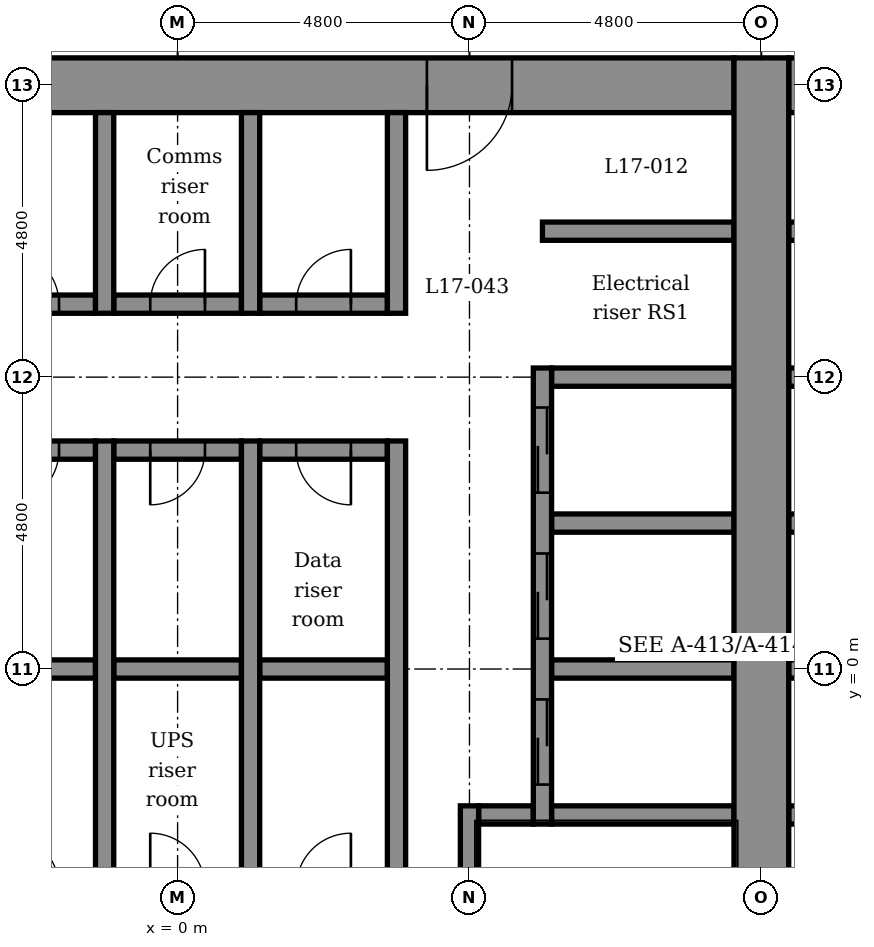
"""IFC4 building model, lengths in metres.
Left out: names, types, materials, properties, quantities, classifications, styles, units other than length and angle.
Written with IfcOpenShell. Run it as: python <this file> out.ifc"""

import sys

from ifc_helpers import new_model, si_unit, direction, frame, frame_2d, origin, place, context, subcontext, project, spatial, rectangle, extrude, element, fill, save


model = new_model("IFC4")
c1 = context("Model", 3, precision=1e-05, world=origin(), true_north=direction((0.0, 1.0)))
c2 = subcontext(c1, "Body", "Model", "MODEL_VIEW")
j1 = project(units=[si_unit("LENGTHUNIT", "METRE"), si_unit("PLANEANGLEUNIT", "RADIAN")], contexts=[c1])
p1 = place(None, origin())
s1 = spatial("IfcSite", under=j1, at=p1, CompositionType="ELEMENT")
p2 = place(p1, origin())
s2 = spatial("IfcBuilding", under=s1, at=p2, CompositionType="ELEMENT")
p3 = place(p2, frame((0.0, 0.0, 91.4)))
s3 = spatial("IfcBuildingStorey", under=s2, at=p3, CompositionType="ELEMENT", Elevation=91.4)
p4 = place(p3, frame((4.95, -2.4, -0.2), z_axis=(0.0, 0.0, 1.0), x_axis=(1.0, 0.0, 0.0)))
e1 = element("IfcWall", 1, at=p4, inside=s3, PredefinedType="STANDARD", context=c2, shape_type="SweptSolid", body=[
    extrude(rectangle(XDim=0.9, YDim=0.3, at=frame_2d((0.45, 0.0))), origin(), (0.0, 0.0, 1.0), 4.5),
])
p5 = place(p3, frame((6.15, -2.4, -0.2), z_axis=(0.0, 0.0, 1.0), x_axis=(1.0, 0.0, 0.0)))
e2 = element("IfcWall", 2, at=p5, inside=s3, PredefinedType="STANDARD", context=c2, shape_type="SweptSolid", body=[
    extrude(rectangle(XDim=3.0, YDim=0.3, at=frame_2d((1.5, 0.0))), origin(), (0.0, 0.0, 1.0), 4.5),
])
p6 = place(p3, frame((10.05, -2.4, -0.2), z_axis=(0.0, 0.0, 1.0), x_axis=(1.0, 0.0, 0.0)))
e3 = element("IfcWall", 3, at=p6, inside=s3, PredefinedType="STANDARD", context=c2, shape_type="SweptSolid", body=[
    extrude(rectangle(XDim=3.9, YDim=0.3, at=frame_2d((1.95, 0.0))), origin(), (0.0, 0.0, 1.0), 4.5),
])
p7 = place(p3, frame((-3.45, 0.0, -0.2), z_axis=(0.0, 0.0, 1.0), x_axis=(1.0, 0.0, 0.0)))
e4 = element("IfcWall", 4, at=p7, inside=s3, PredefinedType="STANDARD", context=c2, shape_type="SweptSolid", body=[
    extrude(rectangle(XDim=2.1, YDim=0.3, at=frame_2d((1.05, 0.0))), origin(), (0.0, 0.0, 1.0), 4.5),
])
p8 = place(p3, frame((-1.05, 0.0, -0.2), z_axis=(0.0, 0.0, 1.0), x_axis=(1.0, 0.0, 0.0)))
e5 = element("IfcWall", 5, at=p8, inside=s3, PredefinedType="STANDARD", context=c2, shape_type="SweptSolid", body=[
    extrude(rectangle(XDim=2.1, YDim=0.3, at=frame_2d((1.05, 0.0))), origin(), (0.0, 0.0, 1.0), 4.5),
])
p9 = place(p3, frame((1.35, 0.0, -0.2), z_axis=(0.0, 0.0, 1.0), x_axis=(1.0, 0.0, 0.0)))
e6 = element("IfcWall", 6, at=p9, inside=s3, PredefinedType="STANDARD", context=c2, shape_type="SweptSolid", body=[
    extrude(rectangle(XDim=2.1, YDim=0.3, at=frame_2d((1.05, 0.0))), origin(), (0.0, 0.0, 1.0), 4.5),
])
p10 = place(p3, frame((6.15, 0.0, -0.2), z_axis=(0.0, 0.0, 1.0), x_axis=(1.0, 0.0, 0.0)))
e7 = element("IfcWall", 7, at=p10, inside=s3, PredefinedType="STANDARD", context=c2, shape_type="SweptSolid", body=[
    extrude(rectangle(XDim=3.0, YDim=0.3, at=frame_2d((1.5, 0.0))), origin(), (0.0, 0.0, 1.0), 4.5),
])
p11 = place(p3, frame((10.05, 0.0, -0.2), z_axis=(0.0, 0.0, 1.0), x_axis=(1.0, 0.0, 0.0)))
e8 = element("IfcWall", 8, at=p11, inside=s3, PredefinedType="STANDARD", context=c2, shape_type="SweptSolid", body=[
    extrude(rectangle(XDim=3.9, YDim=0.3, at=frame_2d((1.95, 0.0))), origin(), (0.0, 0.0, 1.0), 4.5),
])
p12 = place(p3, frame((6.15, 2.4, -0.2), z_axis=(0.0, 0.0, 1.0), x_axis=(1.0, 0.0, 0.0)))
e9 = element("IfcWall", 9, at=p12, inside=s3, PredefinedType="STANDARD", context=c2, shape_type="SweptSolid", body=[
    extrude(rectangle(XDim=3.0, YDim=0.3, at=frame_2d((1.5, 0.0))), origin(), (0.0, 0.0, 1.0), 4.5),
])
p13 = place(p3, frame((10.05, 2.4, -0.2), z_axis=(0.0, 0.0, 1.0), x_axis=(1.0, 0.0, 0.0)))
e10 = element("IfcWall", 10, at=p13, inside=s3, PredefinedType="STANDARD", context=c2, shape_type="SweptSolid", body=[
    extrude(rectangle(XDim=3.9, YDim=0.3, at=frame_2d((1.95, 0.0))), origin(), (0.0, 0.0, 1.0), 4.5),
])
p14 = place(p3, frame((-3.45, 3.6, -0.2), z_axis=(0.0, 0.0, 1.0), x_axis=(1.0, 0.0, 0.0)))
e11 = element("IfcWall", 11, at=p14, inside=s3, PredefinedType="STANDARD", context=c2, shape_type="SweptSolid", body=[
    extrude(rectangle(XDim=2.1, YDim=0.3, at=frame_2d((1.05, 0.0))), origin(), (0.0, 0.0, 1.0), 4.5),
])
p15 = place(p14, frame((0.6, 0.0, 0.2)))
e12 = element("IfcOpeningElement", 12, at=p15, cuts=e11, PredefinedType="OPENING", context=c2, shape_type="SweptSolid", body=[
    extrude(rectangle(XDim=0.9, YDim=2.1, at=frame_2d((0.45, 1.05))), frame((0.0, 0.16, 0.0), z_axis=(0.0, -1.0, 0.0), x_axis=(1.0, 0.0, 0.0)), (0.0, 0.0, 1.0), 0.32),
])
p16 = place(p3, frame((-1.05, 3.6, -0.2), z_axis=(0.0, 0.0, 1.0), x_axis=(1.0, 0.0, 0.0)))
e13 = element("IfcWall", 13, at=p16, inside=s3, PredefinedType="STANDARD", context=c2, shape_type="SweptSolid", body=[
    extrude(rectangle(XDim=2.1, YDim=0.3, at=frame_2d((1.05, 0.0))), origin(), (0.0, 0.0, 1.0), 4.5),
])
p17 = place(p16, frame((0.6, 0.0, 0.2)))
e14 = element("IfcOpeningElement", 14, at=p17, cuts=e13, PredefinedType="OPENING", context=c2, shape_type="SweptSolid", body=[
    extrude(rectangle(XDim=0.9, YDim=2.1, at=frame_2d((0.45, 1.05))), frame((0.0, 0.16, 0.0), z_axis=(0.0, -1.0, 0.0), x_axis=(1.0, 0.0, 0.0)), (0.0, 0.0, 1.0), 0.32),
])
p18 = place(p3, frame((1.35, 3.6, -0.2), z_axis=(0.0, 0.0, 1.0), x_axis=(1.0, 0.0, 0.0)))
e15 = element("IfcWall", 15, at=p18, inside=s3, PredefinedType="STANDARD", context=c2, shape_type="SweptSolid", body=[
    extrude(rectangle(XDim=2.1, YDim=0.3, at=frame_2d((1.05, 0.0))), origin(), (0.0, 0.0, 1.0), 4.5),
])
p19 = place(p18, frame((0.6, 0.0, 0.2)))
e16 = element("IfcOpeningElement", 16, at=p19, cuts=e15, PredefinedType="OPENING", context=c2, shape_type="SweptSolid", body=[
    extrude(rectangle(XDim=0.9, YDim=2.1, at=frame_2d((0.45, 1.05))), frame((0.0, 0.16, 0.0), z_axis=(0.0, -1.0, 0.0), x_axis=(1.0, 0.0, 0.0)), (0.0, 0.0, 1.0), 0.32),
])
p20 = place(p3, frame((6.15, 4.8, -0.2), z_axis=(0.0, 0.0, 1.0), x_axis=(1.0, 0.0, 0.0)))
e17 = element("IfcWall", 17, at=p20, inside=s3, PredefinedType="STANDARD", context=c2, shape_type="SweptSolid", body=[
    extrude(rectangle(XDim=3.0, YDim=0.3, at=frame_2d((1.5, 0.0))), origin(), (0.0, 0.0, 1.0), 4.5),
])
p21 = place(p3, frame((10.05, 4.8, -0.2), z_axis=(0.0, 0.0, 1.0), x_axis=(1.0, 0.0, 0.0)))
e18 = element("IfcWall", 18, at=p21, inside=s3, PredefinedType="STANDARD", context=c2, shape_type="SweptSolid", body=[
    extrude(rectangle(XDim=3.9, YDim=0.3, at=frame_2d((1.95, 0.0))), origin(), (0.0, 0.0, 1.0), 4.5),
])
p22 = place(p3, frame((-3.45, 6.0, -0.2), z_axis=(0.0, 0.0, 1.0), x_axis=(1.0, 0.0, 0.0)))
e19 = element("IfcWall", 19, at=p22, inside=s3, PredefinedType="STANDARD", context=c2, shape_type="SweptSolid", body=[
    extrude(rectangle(XDim=2.1, YDim=0.3, at=frame_2d((1.05, 0.0))), origin(), (0.0, 0.0, 1.0), 4.5),
])
p23 = place(p22, frame((0.6, 0.0, 0.2)))
e20 = element("IfcOpeningElement", 20, at=p23, cuts=e19, PredefinedType="OPENING", context=c2, shape_type="SweptSolid", body=[
    extrude(rectangle(XDim=0.9, YDim=2.1, at=frame_2d((0.45, 1.05))), frame((0.0, 0.16, 0.0), z_axis=(0.0, -1.0, 0.0), x_axis=(1.0, 0.0, 0.0)), (0.0, 0.0, 1.0), 0.32),
])
p24 = place(p3, frame((-1.05, 6.0, -0.2), z_axis=(0.0, 0.0, 1.0), x_axis=(1.0, 0.0, 0.0)))
e21 = element("IfcWall", 21, at=p24, inside=s3, PredefinedType="STANDARD", context=c2, shape_type="SweptSolid", body=[
    extrude(rectangle(XDim=2.1, YDim=0.3, at=frame_2d((1.05, 0.0))), origin(), (0.0, 0.0, 1.0), 4.5),
])
p25 = place(p24, frame((0.6, 0.0, 0.2)))
e22 = element("IfcOpeningElement", 22, at=p25, cuts=e21, PredefinedType="OPENING", context=c2, shape_type="SweptSolid", body=[
    extrude(rectangle(XDim=0.9, YDim=2.1, at=frame_2d((0.45, 1.05))), frame((0.0, 0.16, 0.0), z_axis=(0.0, -1.0, 0.0), x_axis=(1.0, 0.0, 0.0)), (0.0, 0.0, 1.0), 0.32),
])
p26 = place(p3, frame((1.35, 6.0, -0.2), z_axis=(0.0, 0.0, 1.0), x_axis=(1.0, 0.0, 0.0)))
e23 = element("IfcWall", 23, at=p26, inside=s3, PredefinedType="STANDARD", context=c2, shape_type="SweptSolid", body=[
    extrude(rectangle(XDim=2.1, YDim=0.3, at=frame_2d((1.05, 0.0))), origin(), (0.0, 0.0, 1.0), 4.5),
])
p27 = place(p26, frame((0.6, 0.0, 0.2)))
e24 = element("IfcOpeningElement", 24, at=p27, cuts=e23, PredefinedType="OPENING", context=c2, shape_type="SweptSolid", body=[
    extrude(rectangle(XDim=0.9, YDim=2.1, at=frame_2d((0.45, 1.05))), frame((0.0, 0.16, 0.0), z_axis=(0.0, -1.0, 0.0), x_axis=(1.0, 0.0, 0.0)), (0.0, 0.0, 1.0), 0.32),
])
p28 = place(p3, frame((6.0, 7.2, -0.2), z_axis=(0.0, 0.0, 1.0), x_axis=(1.0, 0.0, 0.0)))
e25 = element("IfcWall", 25, at=p28, inside=s3, PredefinedType="STANDARD", context=c2, shape_type="SweptSolid", body=[
    extrude(rectangle(XDim=3.15, YDim=0.3, at=frame_2d((1.575, 0.0))), origin(), (0.0, 0.0, 1.0), 4.5),
])
p29 = place(p3, frame((10.05, 7.2, -0.2), z_axis=(0.0, 0.0, 1.0), x_axis=(1.0, 0.0, 0.0)))
e26 = element("IfcWall", 26, at=p29, inside=s3, PredefinedType="STANDARD", context=c2, shape_type="SweptSolid", body=[
    extrude(rectangle(XDim=3.9, YDim=0.3, at=frame_2d((1.95, 0.0))), origin(), (0.0, 0.0, 1.0), 4.5),
])
p30 = place(p3, frame((-5.25, 9.6, -0.2), z_axis=(0.0, 0.0, 1.0), x_axis=(1.0, 0.0, 0.0)))
e27 = element("IfcWall", 27, at=p30, inside=s3, PredefinedType="SHEAR", context=c2, shape_type="SweptSolid", body=[
    extrude(rectangle(XDim=14.4, YDim=0.9, at=frame_2d((7.2, 0.0))), origin(), (0.0, 0.0, 1.0), 4.5),
])
p31 = place(p30, frame((9.35, 0.0, 0.2)))
e28 = element("IfcOpeningElement", 28, at=p31, cuts=e27, PredefinedType="OPENING", context=c2, shape_type="SweptSolid", body=[
    extrude(rectangle(XDim=1.4, YDim=2.1, at=frame_2d((0.7, 1.05))), frame((0.0, 0.46, 0.0), z_axis=(0.0, -1.0, 0.0), x_axis=(1.0, 0.0, 0.0)), (0.0, 0.0, 1.0), 0.92),
])
p32 = place(p3, frame((10.05, 9.6, -0.2), z_axis=(0.0, 0.0, 1.0), x_axis=(1.0, 0.0, 0.0)))
e29 = element("IfcWall", 29, at=p32, inside=s3, PredefinedType="SHEAR", context=c2, shape_type="SweptSolid", body=[
    extrude(rectangle(XDim=3.9, YDim=0.9, at=frame_2d((1.95, 0.0))), origin(), (0.0, 0.0, 1.0), 4.5),
])
p33 = place(p32, frame((0.3, 0.0, 0.2)))
e30 = element("IfcOpeningElement", 30, at=p33, cuts=e29, PredefinedType="OPENING", context=c2, shape_type="SweptSolid", body=[
    extrude(rectangle(XDim=0.9, YDim=2.1, at=frame_2d((0.45, 1.05))), frame((0.0, 0.46, 0.0), z_axis=(0.0, -1.0, 0.0), x_axis=(1.0, 0.0, 0.0)), (0.0, 0.0, 1.0), 0.92),
])
p34 = place(p32, frame((2.7, 0.0, 0.2)))
e31 = element("IfcOpeningElement", 31, at=p34, cuts=e29, PredefinedType="OPENING", context=c2, shape_type="SweptSolid", body=[
    extrude(rectangle(XDim=0.9, YDim=2.1, at=frame_2d((0.45, 1.05))), frame((0.0, 0.46, 0.0), z_axis=(0.0, -1.0, 0.0), x_axis=(1.0, 0.0, 0.0)), (0.0, 0.0, 1.0), 0.92),
])
p35 = place(p3, frame((-1.2, -3.75, -0.2), z_axis=(0.0, 0.0, 1.0), x_axis=(0.0, 1.0, 0.0)))
e32 = element("IfcWall", 32, at=p35, inside=s3, PredefinedType="STANDARD", context=c2, shape_type="SweptSolid", body=[
    extrude(rectangle(XDim=7.5, YDim=0.3, at=frame_2d((3.75, 0.0))), origin(), (0.0, 0.0, 1.0), 4.5),
])
p36 = place(p3, frame((-1.2, 5.85, -0.2), z_axis=(0.0, 0.0, 1.0), x_axis=(0.0, 1.0, 0.0)))
e33 = element("IfcWall", 33, at=p36, inside=s3, PredefinedType="STANDARD", context=c2, shape_type="SweptSolid", body=[
    extrude(rectangle(XDim=3.3, YDim=0.3, at=frame_2d((1.65, 0.0))), origin(), (0.0, 0.0, 1.0), 4.5),
])
p37 = place(p3, frame((1.2, -3.75, -0.2), z_axis=(0.0, 0.0, 1.0), x_axis=(0.0, 1.0, 0.0)))
e34 = element("IfcWall", 34, at=p37, inside=s3, PredefinedType="STANDARD", context=c2, shape_type="SweptSolid", body=[
    extrude(rectangle(XDim=7.5, YDim=0.3, at=frame_2d((3.75, 0.0))), origin(), (0.0, 0.0, 1.0), 4.5),
])
p38 = place(p3, frame((1.2, 5.85, -0.2), z_axis=(0.0, 0.0, 1.0), x_axis=(0.0, 1.0, 0.0)))
e35 = element("IfcWall", 35, at=p38, inside=s3, PredefinedType="STANDARD", context=c2, shape_type="SweptSolid", body=[
    extrude(rectangle(XDim=3.3, YDim=0.3, at=frame_2d((1.65, 0.0))), origin(), (0.0, 0.0, 1.0), 4.5),
])
p39 = place(p3, frame((3.6, -3.75, -0.2), z_axis=(0.0, 0.0, 1.0), x_axis=(0.0, 1.0, 0.0)))
e36 = element("IfcWall", 36, at=p39, inside=s3, PredefinedType="STANDARD", context=c2, shape_type="SweptSolid", body=[
    extrude(rectangle(XDim=7.5, YDim=0.3, at=frame_2d((3.75, 0.0))), origin(), (0.0, 0.0, 1.0), 4.5),
])
p40 = place(p3, frame((3.6, 5.85, -0.2), z_axis=(0.0, 0.0, 1.0), x_axis=(0.0, 1.0, 0.0)))
e37 = element("IfcWall", 37, at=p40, inside=s3, PredefinedType="STANDARD", context=c2, shape_type="SweptSolid", body=[
    extrude(rectangle(XDim=3.3, YDim=0.3, at=frame_2d((1.65, 0.0))), origin(), (0.0, 0.0, 1.0), 4.5),
])
p41 = place(p3, frame((4.8, -9.15, -0.2), z_axis=(0.0, 0.0, 1.0), x_axis=(0.0, 1.0, 0.0)))
e38 = element("IfcWall", 38, at=p41, inside=s3, PredefinedType="STANDARD", context=c2, shape_type="SweptSolid", body=[
    extrude(rectangle(XDim=6.9, YDim=0.3, at=frame_2d((3.45, 0.0))), origin(), (0.0, 0.0, 1.0), 4.5),
])
p42 = place(p41, frame((3.7, 0.0, 0.2)))
e39 = element("IfcOpeningElement", 39, at=p42, cuts=e38, PredefinedType="OPENING", context=c2, shape_type="SweptSolid", body=[
    extrude(rectangle(XDim=1.2, YDim=2.1, at=frame_2d((0.6, 1.05))), frame((0.0, 0.16, 0.0), z_axis=(0.0, -1.0, 0.0), x_axis=(1.0, 0.0, 0.0)), (0.0, 0.0, 1.0), 0.32),
])
p43 = place(p3, frame((6.0, -2.55, -0.2), z_axis=(0.0, 0.0, 1.0), x_axis=(0.0, 1.0, 0.0)))
e40 = element("IfcWall", 40, at=p43, inside=s3, PredefinedType="STANDARD", context=c2, shape_type="SweptSolid", body=[
    extrude(rectangle(XDim=7.5, YDim=0.3, at=frame_2d((3.75, 0.0))), origin(), (0.0, 0.0, 1.0), 4.5),
])
p44 = place(p43, frame((0.65, 0.0, 0.2)))
e41 = element("IfcOpeningElement", 41, at=p44, cuts=e40, PredefinedType="OPENING", context=c2, shape_type="SweptSolid", body=[
    extrude(rectangle(XDim=1.4, YDim=2.1, at=frame_2d((0.7, 1.05))), frame((0.0, 0.16, 0.0), z_axis=(0.0, -1.0, 0.0), x_axis=(1.0, 0.0, 0.0)), (0.0, 0.0, 1.0), 0.32),
])
p45 = place(p43, frame((3.05, 0.0, 0.2)))
e42 = element("IfcOpeningElement", 42, at=p45, cuts=e40, PredefinedType="OPENING", context=c2, shape_type="SweptSolid", body=[
    extrude(rectangle(XDim=1.4, YDim=2.1, at=frame_2d((0.7, 1.05))), frame((0.0, 0.16, 0.0), z_axis=(0.0, -1.0, 0.0), x_axis=(1.0, 0.0, 0.0)), (0.0, 0.0, 1.0), 0.32),
])
p46 = place(p43, frame((5.45, 0.0, 0.2)))
e43 = element("IfcOpeningElement", 43, at=p46, cuts=e40, PredefinedType="OPENING", context=c2, shape_type="SweptSolid", body=[
    extrude(rectangle(XDim=1.4, YDim=2.1, at=frame_2d((0.7, 1.05))), frame((0.0, 0.16, 0.0), z_axis=(0.0, -1.0, 0.0), x_axis=(1.0, 0.0, 0.0)), (0.0, 0.0, 1.0), 0.32),
])
p47 = place(p3, frame((9.6, -10.15, -0.2), z_axis=(0.0, 0.0, 1.0), x_axis=(0.0, 1.0, 0.0)))
e44 = element("IfcWall", 44, at=p47, inside=s3, PredefinedType="SHEAR", context=c2, shape_type="SweptSolid", body=[
    extrude(rectangle(XDim=20.2, YDim=0.9, at=frame_2d((10.1, 0.0))), origin(), (0.0, 0.0, 1.0), 4.5),
])
p48 = place(p44, origin())
e45 = element("IfcDoor", 45, at=p48, inside=s3, OperationType="DOUBLE_DOOR_SLIDING", PredefinedType="DOOR", context=c2, shape_type="SweptSolid", body=[
    extrude(rectangle(XDim=1.4, YDim=2.1, at=frame_2d((0.7, 1.05))), frame((0.0, 0.025, 0.0), z_axis=(0.0, -1.0, 0.0), x_axis=(1.0, 0.0, 0.0)), (0.0, 0.0, 1.0), 0.05),
])
fill(e41, e45)
p49 = place(p45, origin())
e46 = element("IfcDoor", 46, at=p49, inside=s3, OperationType="DOUBLE_DOOR_SLIDING", PredefinedType="DOOR", context=c2, shape_type="SweptSolid", body=[
    extrude(rectangle(XDim=1.4, YDim=2.1, at=frame_2d((0.7, 1.05))), frame((0.0, 0.025, 0.0), z_axis=(0.0, -1.0, 0.0), x_axis=(1.0, 0.0, 0.0)), (0.0, 0.0, 1.0), 0.05),
])
fill(e42, e46)
p50 = place(p46, origin())
e47 = element("IfcDoor", 47, at=p50, inside=s3, OperationType="DOUBLE_DOOR_SLIDING", PredefinedType="DOOR", context=c2, shape_type="SweptSolid", body=[
    extrude(rectangle(XDim=1.4, YDim=2.1, at=frame_2d((0.7, 1.05))), frame((0.0, 0.025, 0.0), z_axis=(0.0, -1.0, 0.0), x_axis=(1.0, 0.0, 0.0)), (0.0, 0.0, 1.0), 0.05),
])
fill(e43, e47)
p51 = place(p23, origin())
e48 = element("IfcDoor", 48, at=p51, inside=s3, OperationType="SINGLE_SWING_LEFT", PredefinedType="DOOR", context=c2, shape_type="SweptSolid", body=[
    extrude(rectangle(XDim=0.9, YDim=2.1, at=frame_2d((0.45, 1.05))), frame((0.0, 0.025, 0.0), z_axis=(0.0, -1.0, 0.0), x_axis=(1.0, 0.0, 0.0)), (0.0, 0.0, 1.0), 0.05),
])
fill(e20, e48)
p52 = place(p25, origin())
e49 = element("IfcDoor", 49, at=p52, inside=s3, OperationType="SINGLE_SWING_RIGHT", PredefinedType="DOOR", context=c2, shape_type="SweptSolid", body=[
    extrude(rectangle(XDim=0.9, YDim=2.1, at=frame_2d((0.45, 1.05))), frame((0.0, 0.025, 0.0), z_axis=(0.0, -1.0, 0.0), x_axis=(1.0, 0.0, 0.0)), (0.0, 0.0, 1.0), 0.05),
])
fill(e22, e49)
p53 = place(p27, origin())
e50 = element("IfcDoor", 50, at=p53, inside=s3, OperationType="SINGLE_SWING_RIGHT", PredefinedType="DOOR", context=c2, shape_type="SweptSolid", body=[
    extrude(rectangle(XDim=0.9, YDim=2.1, at=frame_2d((0.45, 1.05))), frame((0.0, 0.025, 0.0), z_axis=(0.0, -1.0, 0.0), x_axis=(1.0, 0.0, 0.0)), (0.0, 0.0, 1.0), 0.05),
])
fill(e24, e50)
p54 = place(p15, frame((0.9, 0.0, 0.0), z_axis=(0.0, 0.0, 1.0), x_axis=(-1.0, 0.0, 0.0)))
e51 = element("IfcDoor", 51, at=p54, inside=s3, OperationType="SINGLE_SWING_LEFT", PredefinedType="DOOR", context=c2, shape_type="SweptSolid", body=[
    extrude(rectangle(XDim=0.9, YDim=2.1, at=frame_2d((0.45, 1.05))), frame((0.0, 0.025, 0.0), z_axis=(0.0, -1.0, 0.0), x_axis=(1.0, 0.0, 0.0)), (0.0, 0.0, 1.0), 0.05),
])
fill(e12, e51)
p55 = place(p17, frame((0.9, 0.0, 0.0), z_axis=(0.0, 0.0, 1.0), x_axis=(-1.0, 0.0, 0.0)))
e52 = element("IfcDoor", 52, at=p55, inside=s3, OperationType="SINGLE_SWING_LEFT", PredefinedType="DOOR", context=c2, shape_type="SweptSolid", body=[
    extrude(rectangle(XDim=0.9, YDim=2.1, at=frame_2d((0.45, 1.05))), frame((0.0, 0.025, 0.0), z_axis=(0.0, -1.0, 0.0), x_axis=(1.0, 0.0, 0.0)), (0.0, 0.0, 1.0), 0.05),
])
fill(e14, e52)
p56 = place(p19, frame((0.9, 0.0, 0.0), z_axis=(0.0, 0.0, 1.0), x_axis=(-1.0, 0.0, 0.0)))
e53 = element("IfcDoor", 53, at=p56, inside=s3, OperationType="SINGLE_SWING_RIGHT", PredefinedType="DOOR", context=c2, shape_type="SweptSolid", body=[
    extrude(rectangle(XDim=0.9, YDim=2.1, at=frame_2d((0.45, 1.05))), frame((0.0, 0.025, 0.0), z_axis=(0.0, -1.0, 0.0), x_axis=(1.0, 0.0, 0.0)), (0.0, 0.0, 1.0), 0.05),
])
fill(e16, e53)
p57 = place(p31, frame((1.4, 0.0, 0.0), z_axis=(0.0, 0.0, 1.0), x_axis=(-1.0, 0.0, 0.0)))
e54 = element("IfcDoor", 54, at=p57, inside=s3, OperationType="SINGLE_SWING_LEFT", PredefinedType="DOOR", context=c2, shape_type="SweptSolid", body=[
    extrude(rectangle(XDim=1.4, YDim=2.1, at=frame_2d((0.7, 1.05))), frame((0.0, 0.025, 0.0), z_axis=(0.0, -1.0, 0.0), x_axis=(1.0, 0.0, 0.0)), (0.0, 0.0, 1.0), 0.05),
])
fill(e28, e54)
save(model, sys.argv[1])
